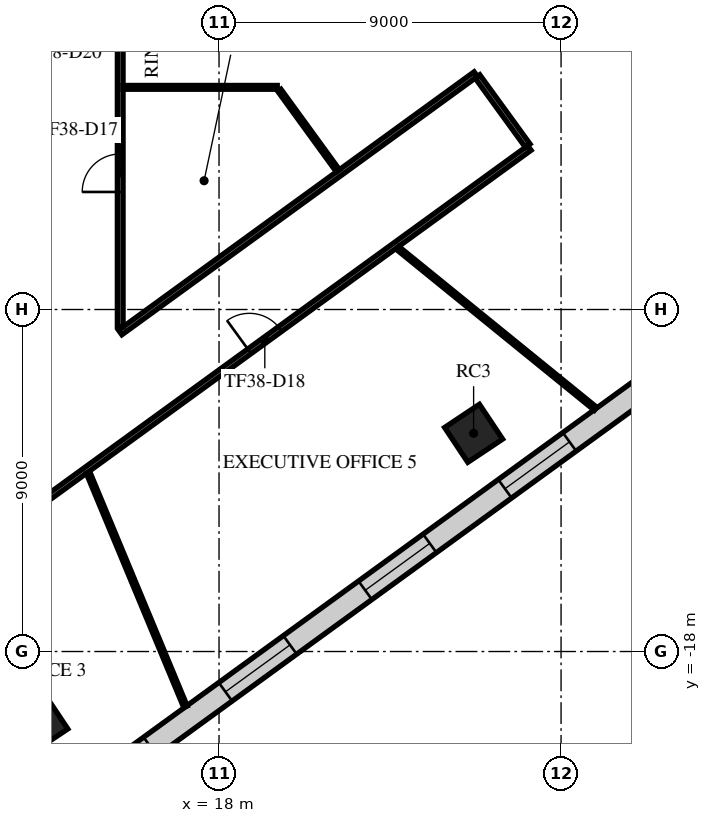
"""IFC4 building model, lengths in metres.
Left out: names, types, materials, properties, quantities, classifications, styles, units other than length and angle.
Written with IfcOpenShell. Run it as: python <this file> out.ifc"""

import sys

from ifc_helpers import new_model, si_unit, direction, frame, frame_2d, origin, origin_2d, place, context, subcontext, project, spatial, rectangle, extrude, element, fill, save


model = new_model("IFC4")
c1 = context("Model", 3, precision=1e-05, world=origin(), true_north=direction((0.0, 1.0)))
c2 = subcontext(c1, "Body", "Model", "MODEL_VIEW")
j1 = project(units=[si_unit("LENGTHUNIT", "METRE"), si_unit("PLANEANGLEUNIT", "RADIAN")], contexts=[c1])
p1 = place(None, origin())
s1 = spatial("IfcSite", under=j1, at=p1, CompositionType="ELEMENT")
p2 = place(p1, origin())
s2 = spatial("IfcBuilding", under=s1, at=p2, CompositionType="ELEMENT")
p3 = place(p2, frame((0.0, 0.0, 163.7)))
s3 = spatial("IfcBuildingStorey", under=s2, at=p3, CompositionType="ELEMENT", Elevation=163.7)
for number, where, z_axis, x_axis in (
    (1, (13.258, -19.885, 0.0), (0.0, 0.0, 1.0), (0.832, 0.555, 0.0)),
    (2, (24.699, -12.258, 0.0), (0.0, 0.0, 1.0), (0.832, 0.555, 0.0)),
):
    element("IfcColumn", number, at=place(p3, frame(where, z_axis=z_axis, x_axis=x_axis)), inside=s3, PredefinedType="COLUMN", context=c2, shape_type="SweptSolid", body=[
        extrude(rectangle(XDim=1.1, YDim=1.1, at=origin_2d()), origin(), (0.0, 0.0, 1.0), 4.0),
    ])
p4 = place(p3, frame((-4.784, -35.737, 0.0), z_axis=(0.0, 0.0, 1.0), x_axis=(0.809019283075, 0.587782102154, 0.0)))
e3 = element("IfcWall", 3, at=p4, inside=s3, PredefinedType="STANDARD", context=c2, shape_type="SweptSolid", body=[
    extrude(rectangle(XDim=49.751, YDim=0.6, at=frame_2d((24.875, 0.0))), origin(), (0.0, 0.0, 1.0), 3.6),
])
p5 = place(p4, frame((1.161, 0.0, 0.9)))
e4 = element("IfcOpeningElement", 4, at=p5, cuts=e3, PredefinedType="OPENING", context=c2, shape_type="SweptSolid", body=[
    extrude(rectangle(XDim=2.1, YDim=2.1, at=frame_2d((1.05, 1.05))), frame((0.0, 0.31, 0.0), z_axis=(0.0, -1.0, 0.0), x_axis=(1.0, 0.0, 0.0)), (0.0, 0.0, 1.0), 0.62),
])
p6 = place(p4, frame((5.644, 0.0, 0.9)))
e5 = element("IfcOpeningElement", 5, at=p6, cuts=e3, PredefinedType="OPENING", context=c2, shape_type="SweptSolid", body=[
    extrude(rectangle(XDim=2.1, YDim=2.1, at=frame_2d((1.05, 1.05))), frame((0.0, 0.31, 0.0), z_axis=(0.0, -1.0, 0.0), x_axis=(1.0, 0.0, 0.0)), (0.0, 0.0, 1.0), 0.62),
])
p7 = place(p4, frame((10.189, 0.0, 0.9)))
e6 = element("IfcOpeningElement", 6, at=p7, cuts=e3, PredefinedType="OPENING", context=c2, shape_type="SweptSolid", body=[
    extrude(rectangle(XDim=2.1, YDim=2.1, at=frame_2d((1.05, 1.05))), frame((0.0, 0.31, 0.0), z_axis=(0.0, -1.0, 0.0), x_axis=(1.0, 0.0, 0.0)), (0.0, 0.0, 1.0), 0.62),
])
p8 = place(p4, frame((14.735, 0.0, 0.9)))
e7 = element("IfcOpeningElement", 7, at=p8, cuts=e3, PredefinedType="OPENING", context=c2, shape_type="SweptSolid", body=[
    extrude(rectangle(XDim=2.1, YDim=2.1, at=frame_2d((1.05, 1.05))), frame((0.0, 0.31, 0.0), z_axis=(0.0, -1.0, 0.0), x_axis=(1.0, 0.0, 0.0)), (0.0, 0.0, 1.0), 0.62),
])
p9 = place(p4, frame((19.28, 0.0, 0.9)))
e8 = element("IfcOpeningElement", 8, at=p9, cuts=e3, PredefinedType="OPENING", context=c2, shape_type="SweptSolid", body=[
    extrude(rectangle(XDim=2.1, YDim=2.1, at=frame_2d((1.05, 1.05))), frame((0.0, 0.31, 0.0), z_axis=(0.0, -1.0, 0.0), x_axis=(1.0, 0.0, 0.0)), (0.0, 0.0, 1.0), 0.62),
])
p10 = place(p4, frame((23.826, 0.0, 0.9)))
e9 = element("IfcOpeningElement", 9, at=p10, cuts=e3, PredefinedType="OPENING", context=c2, shape_type="SweptSolid", body=[
    extrude(rectangle(XDim=2.1, YDim=2.1, at=frame_2d((1.05, 1.05))), frame((0.0, 0.31, 0.0), z_axis=(0.0, -1.0, 0.0), x_axis=(1.0, 0.0, 0.0)), (0.0, 0.0, 1.0), 0.62),
])
p11 = place(p4, frame((28.371, 0.0, 0.9)))
e10 = element("IfcOpeningElement", 10, at=p11, cuts=e3, PredefinedType="OPENING", context=c2, shape_type="SweptSolid", body=[
    extrude(rectangle(XDim=2.1, YDim=2.1, at=frame_2d((1.05, 1.05))), frame((0.0, 0.31, 0.0), z_axis=(0.0, -1.0, 0.0), x_axis=(1.0, 0.0, 0.0)), (0.0, 0.0, 1.0), 0.62),
])
p12 = place(p4, frame((32.917, 0.0, 0.9)))
e11 = element("IfcOpeningElement", 11, at=p12, cuts=e3, PredefinedType="OPENING", context=c2, shape_type="SweptSolid", body=[
    extrude(rectangle(XDim=2.1, YDim=2.1, at=frame_2d((1.05, 1.05))), frame((0.0, 0.31, 0.0), z_axis=(0.0, -1.0, 0.0), x_axis=(1.0, 0.0, 0.0)), (0.0, 0.0, 1.0), 0.62),
])
p13 = place(p4, frame((37.462, 0.0, 0.9)))
e12 = element("IfcOpeningElement", 12, at=p13, cuts=e3, PredefinedType="OPENING", context=c2, shape_type="SweptSolid", body=[
    extrude(rectangle(XDim=2.1, YDim=2.1, at=frame_2d((1.05, 1.05))), frame((0.0, 0.31, 0.0), z_axis=(0.0, -1.0, 0.0), x_axis=(1.0, 0.0, 0.0)), (0.0, 0.0, 1.0), 0.62),
])
p14 = place(p4, frame((42.008, 0.0, 0.9)))
e13 = element("IfcOpeningElement", 13, at=p14, cuts=e3, PredefinedType="OPENING", context=c2, shape_type="SweptSolid", body=[
    extrude(rectangle(XDim=2.1, YDim=2.1, at=frame_2d((1.05, 1.05))), frame((0.0, 0.31, 0.0), z_axis=(0.0, -1.0, 0.0), x_axis=(1.0, 0.0, 0.0)), (0.0, 0.0, 1.0), 0.62),
])
p15 = place(p4, frame((46.491, 0.0, 0.9)))
e14 = element("IfcOpeningElement", 14, at=p15, cuts=e3, PredefinedType="OPENING", context=c2, shape_type="SweptSolid", body=[
    extrude(rectangle(XDim=2.1, YDim=2.1, at=frame_2d((1.05, 1.05))), frame((0.0, 0.31, 0.0), z_axis=(0.0, -1.0, 0.0), x_axis=(1.0, 0.0, 0.0)), (0.0, 0.0, 1.0), 0.62),
])
p16 = place(p3, frame((-3.509, -26.309, 0.0), z_axis=(0.0, 0.0, 1.0), x_axis=(0.809024097608, 0.587775475407, 0.0)))
e15 = element("IfcWall", 15, at=p16, inside=s3, PredefinedType="PARTITIONING", context=c2, shape_type="SweptSolid", body=[
    extrude(rectangle(XDim=36.68, YDim=0.15, at=frame_2d((18.34, 0.0))), origin(), (0.0, 0.0, 1.0), 3.15),
])
p17 = place(p16, frame((5.361, 0.0, 0.0)))
e16 = element("IfcOpeningElement", 16, at=p17, cuts=e15, PredefinedType="OPENING", context=c2, shape_type="SweptSolid", body=[
    extrude(rectangle(XDim=1.0, YDim=2.1, at=frame_2d((0.5, 1.05))), frame((0.0, 0.085, 0.0), z_axis=(0.0, -1.0, 0.0), x_axis=(1.0, 0.0, 0.0)), (0.0, 0.0, 1.0), 0.17),
])
p18 = place(p16, frame((12.913, 0.0, 0.0)))
e17 = element("IfcOpeningElement", 17, at=p18, cuts=e15, PredefinedType="OPENING", context=c2, shape_type="SweptSolid", body=[
    extrude(rectangle(XDim=1.0, YDim=2.1, at=frame_2d((0.5, 1.05))), frame((0.0, 0.085, 0.0), z_axis=(0.0, -1.0, 0.0), x_axis=(1.0, 0.0, 0.0)), (0.0, 0.0, 1.0), 0.17),
])
p19 = place(p16, frame((27.576, 0.0, 0.0)))
e18 = element("IfcOpeningElement", 18, at=p19, cuts=e15, PredefinedType="OPENING", context=c2, shape_type="SweptSolid", body=[
    extrude(rectangle(XDim=1.0, YDim=2.1, at=frame_2d((0.5, 1.05))), frame((0.0, 0.085, 0.0), z_axis=(0.0, -1.0, 0.0), x_axis=(1.0, 0.0, 0.0)), (0.0, 0.0, 1.0), 0.17),
])
p20 = place(p3, frame((15.4, -9.604, 0.0), z_axis=(0.0, 0.0, 1.0), x_axis=(0.809039975854, 0.5877536197, 0.0)))
e19 = element("IfcWall", 19, at=p20, inside=s3, PredefinedType="PARTITIONING", context=c2, shape_type="SweptSolid", body=[
    extrude(rectangle(XDim=11.564, YDim=0.15, at=frame_2d((5.782, 0.0))), origin(), (0.0, 0.0, 1.0), 3.15),
])
p21 = place(p3, frame((15.4, -9.457, 0.0), z_axis=(0.0, 0.0, 1.0), x_axis=(0.0, 1.0, 0.0)))
e20 = element("IfcWall", 20, at=p21, inside=s3, PredefinedType="PARTITIONING", context=c2, shape_type="SweptSolid", body=[
    extrude(rectangle(XDim=20.571, YDim=0.15, at=frame_2d((10.285, 0.0))), origin(), (0.0, 0.0, 1.0), 3.15),
])
p22 = place(p21, frame((3.55, 0.0, 0.0)))
e21 = element("IfcOpeningElement", 21, at=p22, cuts=e20, PredefinedType="OPENING", context=c2, shape_type="SweptSolid", body=[
    extrude(rectangle(XDim=1.0, YDim=2.1, at=frame_2d((0.5, 1.05))), frame((0.0, 0.085, 0.0), z_axis=(0.0, -1.0, 0.0), x_axis=(1.0, 0.0, 0.0)), (0.0, 0.0, 1.0), 0.17),
])
p23 = place(p21, frame((7.853, 0.0, 0.0)))
e22 = element("IfcOpeningElement", 22, at=p23, cuts=e20, PredefinedType="OPENING", context=c2, shape_type="SweptSolid", body=[
    extrude(rectangle(XDim=1.8, YDim=2.1, at=frame_2d((0.9, 1.05))), frame((0.0, 0.085, 0.0), z_axis=(0.0, -1.0, 0.0), x_axis=(1.0, 0.0, 0.0)), (0.0, 0.0, 1.0), 0.17),
])
p24 = place(p3, frame((24.8, -2.868, 0.0), z_axis=(0.0, 0.0, 1.0), x_axis=(0.587513359373, -0.809214466355, 0.0)))
e23 = element("IfcWall", 23, at=p24, inside=s3, PredefinedType="PARTITIONING", context=c2, shape_type="SweptSolid", body=[
    extrude(rectangle(XDim=2.25, YDim=0.15, at=frame_2d((1.125, 0.0))), origin(), (0.0, 0.0, 1.0), 3.15),
])
p25 = place(p3, frame((14.554, -13.292, 0.0), z_axis=(0.0, 0.0, 1.0), x_axis=(0.384012483771, -0.923327900753, 0.0)))
e24 = element("IfcWall", 24, at=p25, inside=s3, PredefinedType="PARTITIONING", context=c2, shape_type="SweptSolid", body=[
    extrude(rectangle(XDim=6.672, YDim=0.1, at=frame_2d((3.336, 0.0))), origin(), (0.0, 0.0, 1.0), 2.9),
])
p26 = place(p3, frame((15.475, -3.154, 0.0), z_axis=(0.0, 0.0, 1.0), x_axis=(1.0, 0.0, 0.0)))
e25 = element("IfcWall", 25, at=p26, inside=s3, PredefinedType="PARTITIONING", context=c2, shape_type="SweptSolid", body=[
    extrude(rectangle(XDim=4.057, YDim=0.1, at=frame_2d((2.028, 0.0))), origin(), (0.0, 0.0, 1.0), 3.6),
])
p27 = place(p3, frame((19.59, -3.233, 0.0), z_axis=(0.0, 0.0, 1.0), x_axis=(0.587855456346, -0.80896598349, 0.0)))
e26 = element("IfcWall", 26, at=p27, inside=s3, PredefinedType="PARTITIONING", context=c2, shape_type="SweptSolid", body=[
    extrude(rectangle(XDim=2.617, YDim=0.1, at=frame_2d((1.309, 0.0))), origin(), (0.0, 0.0, 1.0), 3.15),
])
p28 = place(p3, frame((22.696, -7.378, 0.0), z_axis=(0.0, 0.0, 1.0), x_axis=(0.776171827552, -0.630521446197, 0.0)))
e27 = element("IfcWall", 27, at=p28, inside=s3, PredefinedType="PARTITIONING", context=c2, shape_type="SweptSolid", body=[
    extrude(rectangle(XDim=6.715, YDim=0.1, at=frame_2d((3.357, 0.0))), origin(), (0.0, 0.0, 1.0), 2.9),
])
p29 = place(p11, origin())
e28 = element("IfcWindow", 28, at=p29, inside=s3, PartitioningType="SINGLE_PANEL", PredefinedType="WINDOW", context=c2, shape_type="SweptSolid", body=[
    extrude(rectangle(XDim=2.1, YDim=2.1, at=frame_2d((1.05, 1.05))), frame((0.0, 0.03, 0.0), z_axis=(0.0, -1.0, 0.0), x_axis=(1.0, 0.0, 0.0)), (0.0, 0.0, 1.0), 0.06),
])
fill(e10, e28)
p30 = place(p12, origin())
e29 = element("IfcWindow", 29, at=p30, inside=s3, PartitioningType="SINGLE_PANEL", PredefinedType="WINDOW", context=c2, shape_type="SweptSolid", body=[
    extrude(rectangle(XDim=2.1, YDim=2.1, at=frame_2d((1.05, 1.05))), frame((0.0, 0.03, 0.0), z_axis=(0.0, -1.0, 0.0), x_axis=(1.0, 0.0, 0.0)), (0.0, 0.0, 1.0), 0.06),
])
fill(e11, e29)
p31 = place(p13, origin())
e30 = element("IfcWindow", 30, at=p31, inside=s3, PartitioningType="SINGLE_PANEL", PredefinedType="WINDOW", context=c2, shape_type="SweptSolid", body=[
    extrude(rectangle(XDim=2.1, YDim=2.1, at=frame_2d((1.05, 1.05))), frame((0.0, 0.03, 0.0), z_axis=(0.0, -1.0, 0.0), x_axis=(1.0, 0.0, 0.0)), (0.0, 0.0, 1.0), 0.06),
])
fill(e12, e30)
p32 = place(p22, frame((1.0, 0.0, 0.0), z_axis=(0.0, 0.0, 1.0), x_axis=(-1.0, 0.0, 0.0)))
e31 = element("IfcDoor", 31, at=p32, inside=s3, OperationType="SINGLE_SWING_LEFT", PredefinedType="DOOR", context=c2, shape_type="SweptSolid", body=[
    extrude(rectangle(XDim=1.0, YDim=2.1, at=frame_2d((0.5, 1.05))), frame((0.0, 0.025, 0.0), z_axis=(0.0, -1.0, 0.0), x_axis=(1.0, 0.0, 0.0)), (0.0, 0.0, 1.0), 0.05),
])
fill(e21, e31)
p33 = place(p19, frame((1.0, 0.0, 0.0), z_axis=(0.0, 0.0, 1.0), x_axis=(-1.0, 0.0, 0.0)))
e32 = element("IfcDoor", 32, at=p33, inside=s3, OperationType="SINGLE_SWING_RIGHT", PredefinedType="DOOR", context=c2, shape_type="SweptSolid", body=[
    extrude(rectangle(XDim=1.0, YDim=2.1, at=frame_2d((0.5, 1.05))), frame((0.0, 0.025, 0.0), z_axis=(0.0, -1.0, 0.0), x_axis=(1.0, 0.0, 0.0)), (0.0, 0.0, 1.0), 0.05),
])
fill(e18, e32)
save(model, sys.argv[1])
